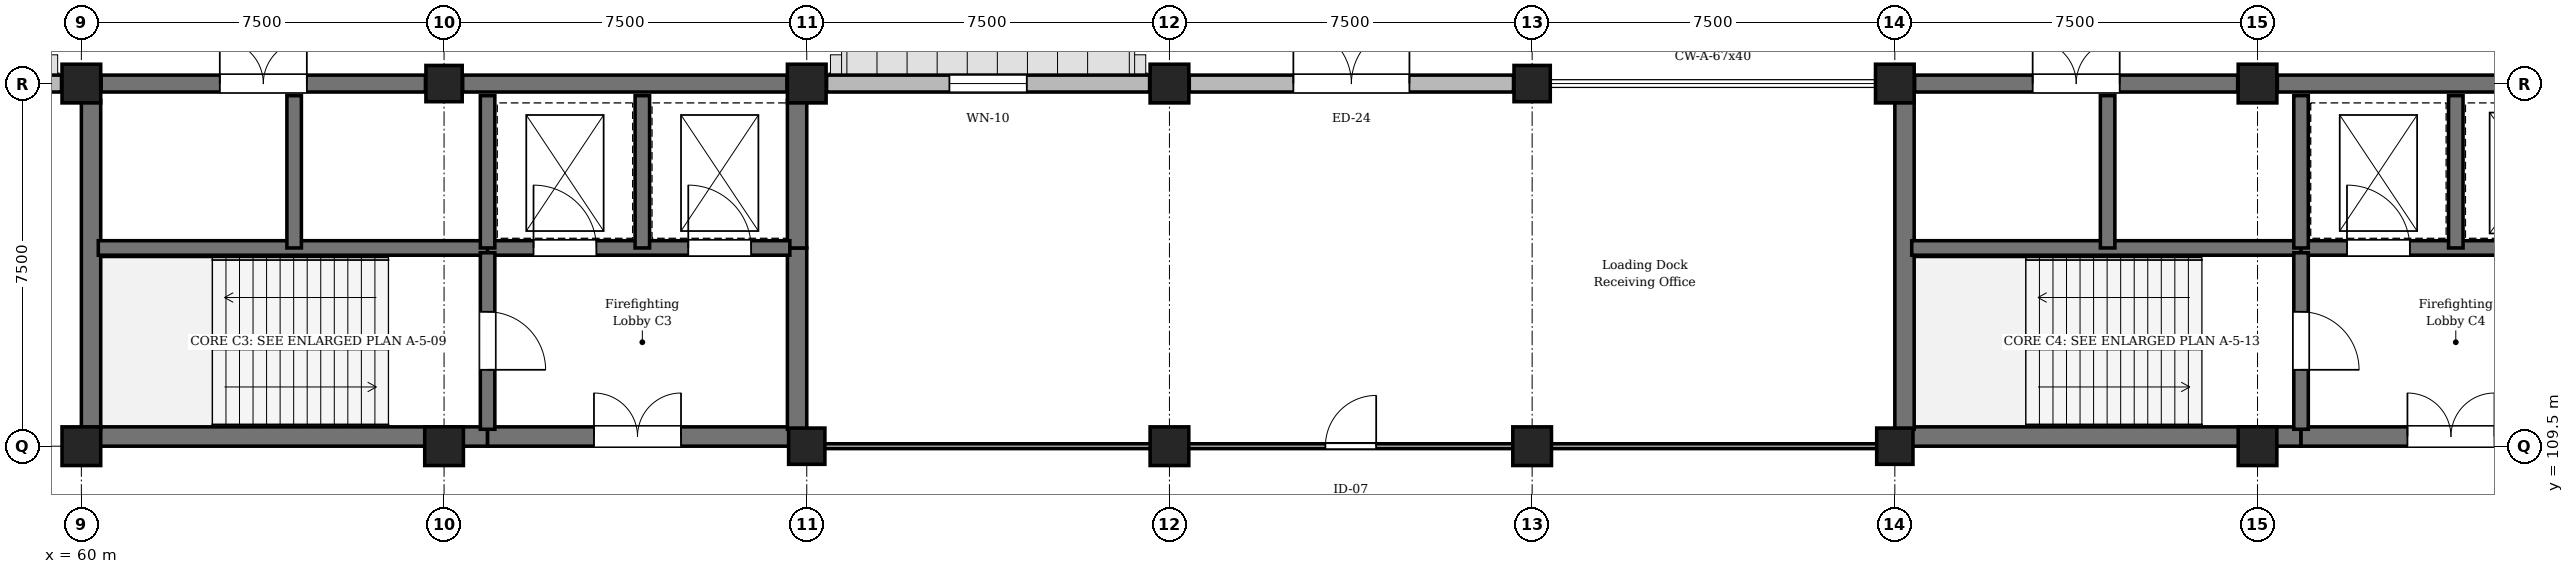
"""IFC4 building model, lengths in metres.
Left out: names, types, materials, properties, quantities, classifications, styles, units other than length and angle.
Written with IfcOpenShell. Run it as: python <this file> out.ifc"""

import sys

from ifc_helpers import new_model, si_unit, direction, frame, frame_2d, origin, origin_2d, place, context, subcontext, project, spatial, rectangle, circle, extrude, element, fill, save


model = new_model("IFC4")
c1 = context("Model", 3, precision=1e-05, world=origin(), true_north=direction((0.0, 1.0)))
c2 = subcontext(c1, "Body", "Model", "MODEL_VIEW")
j1 = project(units=[si_unit("LENGTHUNIT", "METRE"), si_unit("PLANEANGLEUNIT", "RADIAN")], contexts=[c1])
p1 = place(None, origin())
s1 = spatial("IfcSite", under=j1, at=p1, CompositionType="ELEMENT")
p2 = place(p1, origin())
s2 = spatial("IfcBuilding", under=s1, at=p2, CompositionType="ELEMENT")
p3 = place(p2, origin())
s3 = spatial("IfcBuildingStorey", under=s2, at=p3, CompositionType="ELEMENT", Elevation=0.0)
for number, where, z_axis, x_axis in (
    (1, (60.0, 109.5, 0.0), (0.0, 0.0, 1.0), (1.0, 0.0, 0.0)),
    (2, (60.0, 117.0, 0.0), (0.0, 0.0, 1.0), (1.0, 0.0, 0.0)),
    (3, (67.5, 109.5, 0.0), (0.0, 0.0, 1.0), (1.0, 0.0, 0.0)),
):
    element("IfcColumn", number, at=place(p3, frame(where, z_axis=z_axis, x_axis=x_axis)), inside=s3, PredefinedType="COLUMN", context=c2, shape_type="SweptSolid", body=[
        extrude(rectangle(XDim=0.8, YDim=0.8, at=origin_2d()), origin(), (0.0, 0.0, 1.0), 4.8),
    ])
for number, where, z_axis, x_axis in (
    (4, (67.5, 117.0, 0.0), (0.0, 0.0, 1.0), (1.0, 0.0, 0.0)),
    (5, (75.0, 109.5, 0.0), (0.0, 0.0, 1.0), (1.0, 0.0, 0.0)),
):
    element("IfcColumn", number, at=place(p3, frame(where, z_axis=z_axis, x_axis=x_axis)), inside=s3, PredefinedType="COLUMN", context=c2, shape_type="SweptSolid", body=[
        extrude(circle(Radius=0.375, at=origin_2d()), origin(), (0.0, 0.0, 1.0), 4.8),
    ])
for number, where, z_axis, x_axis in (
    (6, (75.0, 117.0, 0.0), (0.0, 0.0, 1.0), (1.0, 0.0, 0.0)),
    (7, (82.5, 109.5, 0.0), (0.0, 0.0, 1.0), (1.0, 0.0, 0.0)),
    (8, (82.5, 117.0, 0.0), (0.0, 0.0, 1.0), (1.0, 0.0, 0.0)),
    (9, (90.0, 109.5, 0.0), (0.0, 0.0, 1.0), (1.0, 0.0, 0.0)),
):
    element("IfcColumn", number, at=place(p3, frame(where, z_axis=z_axis, x_axis=x_axis)), inside=s3, PredefinedType="COLUMN", context=c2, shape_type="SweptSolid", body=[
        extrude(rectangle(XDim=0.8, YDim=0.8, at=origin_2d()), origin(), (0.0, 0.0, 1.0), 4.8),
    ])
for number, where, z_axis, x_axis in (
    (10, (90.0, 117.0, 0.0), (0.0, 0.0, 1.0), (1.0, 0.0, 0.0)),
    (11, (97.5, 109.5, 0.0), (0.0, 0.0, 1.0), (1.0, 0.0, 0.0)),
):
    element("IfcColumn", number, at=place(p3, frame(where, z_axis=z_axis, x_axis=x_axis)), inside=s3, PredefinedType="COLUMN", context=c2, shape_type="SweptSolid", body=[
        extrude(circle(Radius=0.375, at=origin_2d()), origin(), (0.0, 0.0, 1.0), 4.8),
    ])
for number, where, z_axis, x_axis in (
    (12, (97.5, 117.0, 0.0), (0.0, 0.0, 1.0), (1.0, 0.0, 0.0)),
    (13, (105.0, 109.5, 0.0), (0.0, 0.0, 1.0), (1.0, 0.0, 0.0)),
    (14, (105.0, 117.0, 0.0), (0.0, 0.0, 1.0), (1.0, 0.0, 0.0)),
):
    element("IfcColumn", number, at=place(p3, frame(where, z_axis=z_axis, x_axis=x_axis)), inside=s3, PredefinedType="COLUMN", context=c2, shape_type="SweptSolid", body=[
        extrude(rectangle(XDim=0.8, YDim=0.8, at=origin_2d()), origin(), (0.0, 0.0, 1.0), 4.8),
    ])
p4 = place(p3, frame((52.885, 117.0, 0.0), z_axis=(0.0, 0.0, 1.0), x_axis=(1.0, 0.0, 0.0)))
e15 = element("IfcWall", 15, at=p4, inside=s3, PredefinedType="STANDARD", context=c2, shape_type="SweptSolid", body=[
    extrude(rectangle(XDim=6.705, YDim=0.35, at=frame_2d((3.353, 0.0))), origin(), (0.0, 0.0, 1.0), 3.95),
])
p5 = place(p4, frame((2.752, 0.0, 0.9)))
e16 = element("IfcOpeningElement", 16, at=p5, cuts=e15, PredefinedType="OPENING", context=c2, shape_type="SweptSolid", body=[
    extrude(rectangle(XDim=1.2, YDim=2.1, at=frame_2d((0.6, 1.05))), frame((0.0, 0.185, 0.0), z_axis=(0.0, -1.0, 0.0), x_axis=(1.0, 0.0, 0.0)), (0.0, 0.0, 1.0), 0.37),
])
p6 = place(p3, frame((60.41, 117.0, 0.0), z_axis=(0.0, 0.0, 1.0), x_axis=(1.0, 0.0, 0.0)))
e17 = element("IfcWall", 17, at=p6, inside=s3, PredefinedType="SHEAR", context=c2, shape_type="SweptSolid", body=[
    extrude(rectangle(XDim=6.705, YDim=0.35, at=frame_2d((3.353, 0.0))), origin(), (0.0, 0.0, 1.0), 4.5),
])
p7 = place(p6, frame((2.452, 0.0, 0.0)))
e18 = element("IfcOpeningElement", 18, at=p7, cuts=e17, PredefinedType="OPENING", context=c2, shape_type="SweptSolid", body=[
    extrude(rectangle(XDim=1.8, YDim=2.5, at=frame_2d((0.9, 1.25))), frame((0.0, 0.185, 0.0), z_axis=(0.0, -1.0, 0.0), x_axis=(1.0, 0.0, 0.0)), (0.0, 0.0, 1.0), 0.37),
])
p8 = place(p3, frame((67.885, 117.0, 0.0), z_axis=(0.0, 0.0, 1.0), x_axis=(1.0, 0.0, 0.0)))
e19 = element("IfcWall", 19, at=p8, inside=s3, PredefinedType="SHEAR", context=c2, shape_type="SweptSolid", body=[
    extrude(rectangle(XDim=6.705, YDim=0.35, at=frame_2d((3.353, 0.0))), origin(), (0.0, 0.0, 1.0), 4.5),
])
p9 = place(p3, frame((75.41, 117.0, 0.0), z_axis=(0.0, 0.0, 1.0), x_axis=(1.0, 0.0, 0.0)))
e20 = element("IfcWall", 20, at=p9, inside=s3, PredefinedType="STANDARD", context=c2, shape_type="SweptSolid", body=[
    extrude(rectangle(XDim=6.68, YDim=0.35, at=frame_2d((3.34, 0.0))), origin(), (0.0, 0.0, 1.0), 3.95),
])
p10 = place(p9, frame((2.54, 0.0, 0.9)))
e21 = element("IfcOpeningElement", 21, at=p10, cuts=e20, PredefinedType="OPENING", context=c2, shape_type="SweptSolid", body=[
    extrude(rectangle(XDim=1.6, YDim=1.95, at=frame_2d((0.8, 0.975))), frame((0.0, 0.185, 0.0), z_axis=(0.0, -1.0, 0.0), x_axis=(1.0, 0.0, 0.0)), (0.0, 0.0, 1.0), 0.37),
])
p11 = place(p3, frame((82.91, 117.0, 0.0), z_axis=(0.0, 0.0, 1.0), x_axis=(1.0, 0.0, 0.0)))
e22 = element("IfcWall", 22, at=p11, inside=s3, PredefinedType="STANDARD", context=c2, shape_type="SweptSolid", body=[
    extrude(rectangle(XDim=6.705, YDim=0.35, at=frame_2d((3.353, 0.0))), origin(), (0.0, 0.0, 1.0), 3.95),
])
p12 = place(p11, frame((2.153, 0.0, 0.0)))
e23 = element("IfcOpeningElement", 23, at=p12, cuts=e22, PredefinedType="OPENING", context=c2, shape_type="SweptSolid", body=[
    extrude(rectangle(XDim=2.4, YDim=2.7, at=frame_2d((1.2, 1.35))), frame((0.0, 0.185, 0.0), z_axis=(0.0, -1.0, 0.0), x_axis=(1.0, 0.0, 0.0)), (0.0, 0.0, 1.0), 0.37),
])
p13 = place(p3, frame((97.91, 117.0, 0.0), z_axis=(0.0, 0.0, 1.0), x_axis=(1.0, 0.0, 0.0)))
e24 = element("IfcWall", 24, at=p13, inside=s3, PredefinedType="SHEAR", context=c2, shape_type="SweptSolid", body=[
    extrude(rectangle(XDim=6.68, YDim=0.35, at=frame_2d((3.34, 0.0))), origin(), (0.0, 0.0, 1.0), 4.5),
])
p14 = place(p13, frame((2.44, 0.0, 0.0)))
e25 = element("IfcOpeningElement", 25, at=p14, cuts=e24, PredefinedType="OPENING", context=c2, shape_type="SweptSolid", body=[
    extrude(rectangle(XDim=1.8, YDim=2.5, at=frame_2d((0.9, 1.25))), frame((0.0, 0.185, 0.0), z_axis=(0.0, -1.0, 0.0), x_axis=(1.0, 0.0, 0.0)), (0.0, 0.0, 1.0), 0.37),
])
p15 = place(p3, frame((105.41, 117.0, 0.0), z_axis=(0.0, 0.0, 1.0), x_axis=(1.0, 0.0, 0.0)))
e26 = element("IfcWall", 26, at=p15, inside=s3, PredefinedType="SHEAR", context=c2, shape_type="SweptSolid", body=[
    extrude(rectangle(XDim=6.705, YDim=0.35, at=frame_2d((3.353, 0.0))), origin(), (0.0, 0.0, 1.0), 4.5),
])
p16 = place(p3, frame((60.35, 109.7, 0.0), z_axis=(0.0, 0.0, 1.0), x_axis=(1.0, 0.0, 0.0)))
e27 = element("IfcWall", 27, at=p16, inside=s3, PredefinedType="SHEAR", context=c2, shape_type="SweptSolid", body=[
    extrude(rectangle(XDim=8.05, YDim=0.4, at=frame_2d((4.025, 0.0))), origin(), (0.0, 0.0, 1.0), 4.5),
])
p17 = place(p3, frame((68.4, 109.7, 0.0), z_axis=(0.0, 0.0, 1.0), x_axis=(1.0, 0.0, 0.0)))
e28 = element("IfcWall", 28, at=p17, inside=s3, PredefinedType="SHEAR", context=c2, shape_type="SweptSolid", body=[
    extrude(rectangle(XDim=6.25, YDim=0.4, at=frame_2d((3.125, 0.0))), origin(), (0.0, 0.0, 1.0), 4.5),
])
p18 = place(p17, frame((2.2, 0.0, 0.0)))
e29 = element("IfcOpeningElement", 29, at=p18, cuts=e28, PredefinedType="OPENING", context=c2, shape_type="SweptSolid", body=[
    extrude(rectangle(XDim=1.8, YDim=2.25, at=frame_2d((0.9, 1.125))), frame((0.0, 0.21, 0.0), z_axis=(0.0, -1.0, 0.0), x_axis=(1.0, 0.0, 0.0)), (0.0, 0.0, 1.0), 0.42),
])
p19 = place(p3, frame((60.2, 109.85, 0.0), z_axis=(0.0, 0.0, 1.0), x_axis=(0.0, 1.0, 0.0)))
e30 = element("IfcWall", 30, at=p19, inside=s3, PredefinedType="SHEAR", context=c2, shape_type="SweptSolid", body=[
    extrude(rectangle(XDim=6.8, YDim=0.4, at=frame_2d((3.4, 0.0))), origin(), (0.0, 0.0, 1.0), 4.5),
])
p20 = place(p3, frame((74.8, 109.85, 0.0), z_axis=(0.0, 0.0, 1.0), x_axis=(0.0, 1.0, 0.0)))
e31 = element("IfcWall", 31, at=p20, inside=s3, PredefinedType="SHEAR", context=c2, shape_type="SweptSolid", body=[
    extrude(rectangle(XDim=3.75, YDim=0.4, at=frame_2d((1.875, 0.0))), origin(), (0.0, 0.0, 1.0), 4.5),
])
p21 = place(p3, frame((74.8, 113.6, 0.0), z_axis=(0.0, 0.0, 1.0), x_axis=(0.0, 1.0, 0.0)))
e32 = element("IfcWall", 32, at=p21, inside=s3, PredefinedType="SHEAR", context=c2, shape_type="SweptSolid", body=[
    extrude(rectangle(XDim=3.05, YDim=0.4, at=frame_2d((1.525, 0.0))), origin(), (0.0, 0.0, 1.0), 4.5),
])
p22 = place(p3, frame((60.35, 113.6, 0.0), z_axis=(0.0, 0.0, 1.0), x_axis=(1.0, 0.0, 0.0)))
e33 = element("IfcWall", 33, at=p22, inside=s3, PredefinedType="SHEAR", context=c2, shape_type="SweptSolid", body=[
    extrude(rectangle(XDim=8.05, YDim=0.3, at=frame_2d((4.025, 0.0))), origin(), (0.0, 0.0, 1.0), 4.5),
])
p23 = place(p3, frame((68.4, 113.6, 0.0), z_axis=(0.0, 0.0, 1.0), x_axis=(1.0, 0.0, 0.0)))
e34 = element("IfcWall", 34, at=p23, inside=s3, PredefinedType="SHEAR", context=c2, shape_type="SweptSolid", body=[
    extrude(rectangle(XDim=6.25, YDim=0.3, at=frame_2d((3.125, 0.0))), origin(), (0.0, 0.0, 1.0), 4.5),
])
p24 = place(p23, frame((0.95, 0.0, 0.0)))
e35 = element("IfcOpeningElement", 35, at=p24, cuts=e34, PredefinedType="OPENING", context=c2, shape_type="SweptSolid", body=[
    extrude(rectangle(XDim=1.3, YDim=2.2, at=frame_2d((0.65, 1.1))), frame((0.0, 0.16, 0.0), z_axis=(0.0, -1.0, 0.0), x_axis=(1.0, 0.0, 0.0)), (0.0, 0.0, 1.0), 0.32),
])
p25 = place(p23, frame((4.15, 0.0, 0.0)))
e36 = element("IfcOpeningElement", 36, at=p25, cuts=e34, PredefinedType="OPENING", context=c2, shape_type="SweptSolid", body=[
    extrude(rectangle(XDim=1.3, YDim=2.2, at=frame_2d((0.65, 1.1))), frame((0.0, 0.16, 0.0), z_axis=(0.0, -1.0, 0.0), x_axis=(1.0, 0.0, 0.0)), (0.0, 0.0, 1.0), 0.32),
])
p26 = place(p3, frame((68.4, 113.5, 0.0), z_axis=(0.0, 0.0, 1.0), x_axis=(0.0, -1.0, 0.0)))
e37 = element("IfcWall", 37, at=p26, inside=s3, PredefinedType="SHEAR", context=c2, shape_type="SweptSolid", body=[
    extrude(rectangle(XDim=3.65, YDim=0.3, at=frame_2d((1.825, 0.0))), origin(), (0.0, 0.0, 1.0), 4.5),
])
p27 = place(p26, frame((1.22, 0.0, 0.0)))
e38 = element("IfcOpeningElement", 38, at=p27, cuts=e37, PredefinedType="OPENING", context=c2, shape_type="SweptSolid", body=[
    extrude(rectangle(XDim=1.2, YDim=2.25, at=frame_2d((0.6, 1.125))), frame((0.0, 0.16, 0.0), z_axis=(0.0, -1.0, 0.0), x_axis=(1.0, 0.0, 0.0)), (0.0, 0.0, 1.0), 0.32),
])
for number, where, z_axis, x_axis in (
    (39, (64.4, 113.6, 0.0), (0.0, 0.0, 1.0), (0.0, 1.0, 0.0)),
    (40, (68.4, 113.6, 0.0), (0.0, 0.0, 1.0), (0.0, 1.0, 0.0)),
    (41, (71.6, 113.6, 0.0), (0.0, 0.0, 1.0), (0.0, 1.0, 0.0)),
):
    element("IfcWall", number, at=place(p3, frame(where, z_axis=z_axis, x_axis=x_axis)), inside=s3, PredefinedType="SHEAR", context=c2, shape_type="SweptSolid", body=[
        extrude(rectangle(XDim=3.15, YDim=0.3, at=frame_2d((1.575, 0.0))), origin(), (0.0, 0.0, 1.0), 4.5),
    ])
p28 = place(p3, frame((97.85, 109.7, 0.0), z_axis=(0.0, 0.0, 1.0), x_axis=(1.0, 0.0, 0.0)))
e42 = element("IfcWall", 42, at=p28, inside=s3, PredefinedType="SHEAR", context=c2, shape_type="SweptSolid", body=[
    extrude(rectangle(XDim=8.05, YDim=0.4, at=frame_2d((4.025, 0.0))), origin(), (0.0, 0.0, 1.0), 4.5),
])
p29 = place(p3, frame((105.9, 109.7, 0.0), z_axis=(0.0, 0.0, 1.0), x_axis=(1.0, 0.0, 0.0)))
e43 = element("IfcWall", 43, at=p29, inside=s3, PredefinedType="SHEAR", context=c2, shape_type="SweptSolid", body=[
    extrude(rectangle(XDim=6.25, YDim=0.4, at=frame_2d((3.125, 0.0))), origin(), (0.0, 0.0, 1.0), 4.5),
])
p30 = place(p29, frame((2.2, 0.0, 0.0)))
e44 = element("IfcOpeningElement", 44, at=p30, cuts=e43, PredefinedType="OPENING", context=c2, shape_type="SweptSolid", body=[
    extrude(rectangle(XDim=1.8, YDim=2.25, at=frame_2d((0.9, 1.125))), frame((0.0, 0.21, 0.0), z_axis=(0.0, -1.0, 0.0), x_axis=(1.0, 0.0, 0.0)), (0.0, 0.0, 1.0), 0.42),
])
p31 = place(p3, frame((97.7, 109.85, 0.0), z_axis=(0.0, 0.0, 1.0), x_axis=(0.0, 1.0, 0.0)))
e45 = element("IfcWall", 45, at=p31, inside=s3, PredefinedType="SHEAR", context=c2, shape_type="SweptSolid", body=[
    extrude(rectangle(XDim=6.8, YDim=0.4, at=frame_2d((3.4, 0.0))), origin(), (0.0, 0.0, 1.0), 4.5),
])
p32 = place(p3, frame((97.85, 113.6, 0.0), z_axis=(0.0, 0.0, 1.0), x_axis=(1.0, 0.0, 0.0)))
e46 = element("IfcWall", 46, at=p32, inside=s3, PredefinedType="SHEAR", context=c2, shape_type="SweptSolid", body=[
    extrude(rectangle(XDim=8.05, YDim=0.3, at=frame_2d((4.025, 0.0))), origin(), (0.0, 0.0, 1.0), 4.5),
])
p33 = place(p3, frame((105.9, 113.6, 0.0), z_axis=(0.0, 0.0, 1.0), x_axis=(1.0, 0.0, 0.0)))
e47 = element("IfcWall", 47, at=p33, inside=s3, PredefinedType="SHEAR", context=c2, shape_type="SweptSolid", body=[
    extrude(rectangle(XDim=6.25, YDim=0.3, at=frame_2d((3.125, 0.0))), origin(), (0.0, 0.0, 1.0), 4.5),
])
p34 = place(p33, frame((0.95, 0.0, 0.0)))
e48 = element("IfcOpeningElement", 48, at=p34, cuts=e47, PredefinedType="OPENING", context=c2, shape_type="SweptSolid", body=[
    extrude(rectangle(XDim=1.3, YDim=2.2, at=frame_2d((0.65, 1.1))), frame((0.0, 0.16, 0.0), z_axis=(0.0, -1.0, 0.0), x_axis=(1.0, 0.0, 0.0)), (0.0, 0.0, 1.0), 0.32),
])
p35 = place(p33, frame((4.1, 0.0, 0.0)))
e49 = element("IfcOpeningElement", 49, at=p35, cuts=e47, PredefinedType="OPENING", context=c2, shape_type="SweptSolid", body=[
    extrude(rectangle(XDim=1.4, YDim=2.25, at=frame_2d((0.7, 1.125))), frame((0.0, 0.16, 0.0), z_axis=(0.0, -1.0, 0.0), x_axis=(1.0, 0.0, 0.0)), (0.0, 0.0, 1.0), 0.32),
])
p36 = place(p3, frame((105.9, 113.5, 0.0), z_axis=(0.0, 0.0, 1.0), x_axis=(0.0, -1.0, 0.0)))
e50 = element("IfcWall", 50, at=p36, inside=s3, PredefinedType="SHEAR", context=c2, shape_type="SweptSolid", body=[
    extrude(rectangle(XDim=3.65, YDim=0.3, at=frame_2d((1.825, 0.0))), origin(), (0.0, 0.0, 1.0), 4.5),
])
p37 = place(p36, frame((1.22, 0.0, 0.0)))
e51 = element("IfcOpeningElement", 51, at=p37, cuts=e50, PredefinedType="OPENING", context=c2, shape_type="SweptSolid", body=[
    extrude(rectangle(XDim=1.2, YDim=2.25, at=frame_2d((0.6, 1.125))), frame((0.0, 0.16, 0.0), z_axis=(0.0, -1.0, 0.0), x_axis=(1.0, 0.0, 0.0)), (0.0, 0.0, 1.0), 0.32),
])
for number, where, z_axis, x_axis in (
    (52, (101.9, 113.6, 0.0), (0.0, 0.0, 1.0), (0.0, 1.0, 0.0)),
    (53, (105.9, 113.6, 0.0), (0.0, 0.0, 1.0), (0.0, 1.0, 0.0)),
    (54, (109.1, 113.6, 0.0), (0.0, 0.0, 1.0), (0.0, 1.0, 0.0)),
):
    element("IfcWall", number, at=place(p3, frame(where, z_axis=z_axis, x_axis=x_axis)), inside=s3, PredefinedType="SHEAR", context=c2, shape_type="SweptSolid", body=[
        extrude(rectangle(XDim=3.15, YDim=0.3, at=frame_2d((1.575, 0.0))), origin(), (0.0, 0.0, 1.0), 4.5),
    ])
p38 = place(p3, frame((75.3, 109.5, 0.0), z_axis=(0.0, 0.0, 1.0), x_axis=(1.0, 0.0, 0.0)))
e55 = element("IfcWall", 55, at=p38, inside=s3, PredefinedType="PARTITIONING", context=c2, shape_type="SweptSolid", body=[
    extrude(rectangle(XDim=21.9, YDim=0.1, at=frame_2d((10.95, 0.0))), origin(), (0.0, 0.0, 1.0), 3.835),
])
p39 = place(p38, frame((10.425, 0.0, 0.0)))
e56 = element("IfcOpeningElement", 56, at=p39, cuts=e55, PredefinedType="OPENING", context=c2, shape_type="SweptSolid", body=[
    extrude(rectangle(XDim=1.05, YDim=2.2, at=frame_2d((0.525, 1.1))), frame((0.0, 0.06, 0.0), z_axis=(0.0, -1.0, 0.0), x_axis=(1.0, 0.0, 0.0)), (0.0, 0.0, 1.0), 0.12),
])
p40 = place(p7, origin())
e57 = element("IfcDoor", 57, at=p40, inside=s3, OperationType="DOUBLE_DOOR_SINGLE_SWING", PredefinedType="DOOR", context=c2, shape_type="SweptSolid", body=[
    extrude(rectangle(XDim=1.8, YDim=2.5, at=frame_2d((0.9, 1.25))), frame((0.0, 0.025, 0.0), z_axis=(0.0, -1.0, 0.0), x_axis=(1.0, 0.0, 0.0)), (0.0, 0.0, 1.0), 0.05),
])
fill(e18, e57)
p41 = place(p10, origin())
e58 = element("IfcWindow", 58, at=p41, inside=s3, PartitioningType="SINGLE_PANEL", PredefinedType="WINDOW", context=c2, shape_type="SweptSolid", body=[
    extrude(rectangle(XDim=1.6, YDim=1.95, at=frame_2d((0.8, 0.975))), frame((0.0, 0.03, 0.0), z_axis=(0.0, -1.0, 0.0), x_axis=(1.0, 0.0, 0.0)), (0.0, 0.0, 1.0), 0.06),
])
fill(e21, e58)
p42 = place(p12, origin())
e59 = element("IfcDoor", 59, at=p42, inside=s3, OperationType="DOUBLE_DOOR_SINGLE_SWING", PredefinedType="DOOR", context=c2, shape_type="SweptSolid", body=[
    extrude(rectangle(XDim=2.4, YDim=2.7, at=frame_2d((1.2, 1.35))), frame((0.0, 0.025, 0.0), z_axis=(0.0, -1.0, 0.0), x_axis=(1.0, 0.0, 0.0)), (0.0, 0.0, 1.0), 0.05),
])
fill(e23, e59)
p43 = place(p14, origin())
e60 = element("IfcDoor", 60, at=p43, inside=s3, OperationType="DOUBLE_DOOR_SINGLE_SWING", PredefinedType="DOOR", context=c2, shape_type="SweptSolid", body=[
    extrude(rectangle(XDim=1.8, YDim=2.5, at=frame_2d((0.9, 1.25))), frame((0.0, 0.025, 0.0), z_axis=(0.0, -1.0, 0.0), x_axis=(1.0, 0.0, 0.0)), (0.0, 0.0, 1.0), 0.05),
])
fill(e25, e60)
p44 = place(p18, origin())
e61 = element("IfcDoor", 61, at=p44, inside=s3, OperationType="DOUBLE_DOOR_SINGLE_SWING", PredefinedType="DOOR", context=c2, shape_type="SweptSolid", body=[
    extrude(rectangle(XDim=1.8, YDim=2.25, at=frame_2d((0.9, 1.125))), frame((0.0, 0.025, 0.0), z_axis=(0.0, -1.0, 0.0), x_axis=(1.0, 0.0, 0.0)), (0.0, 0.0, 1.0), 0.05),
])
fill(e29, e61)
p45 = place(p24, origin())
e62 = element("IfcDoor", 62, at=p45, inside=s3, OperationType="DOUBLE_DOOR_SLIDING", PredefinedType="DOOR", context=c2, shape_type="SweptSolid", body=[
    extrude(rectangle(XDim=1.3, YDim=2.2, at=frame_2d((0.65, 1.1))), frame((0.0, 0.025, 0.0), z_axis=(0.0, -1.0, 0.0), x_axis=(1.0, 0.0, 0.0)), (0.0, 0.0, 1.0), 0.05),
])
fill(e35, e62)
p46 = place(p25, origin())
e63 = element("IfcDoor", 63, at=p46, inside=s3, OperationType="DOUBLE_DOOR_SLIDING", PredefinedType="DOOR", context=c2, shape_type="SweptSolid", body=[
    extrude(rectangle(XDim=1.3, YDim=2.2, at=frame_2d((0.65, 1.1))), frame((0.0, 0.025, 0.0), z_axis=(0.0, -1.0, 0.0), x_axis=(1.0, 0.0, 0.0)), (0.0, 0.0, 1.0), 0.05),
])
fill(e36, e63)
p47 = place(p27, origin())
e64 = element("IfcDoor", 64, at=p47, inside=s3, OperationType="SINGLE_SWING_RIGHT", PredefinedType="DOOR", context=c2, shape_type="SweptSolid", body=[
    extrude(rectangle(XDim=1.2, YDim=2.25, at=frame_2d((0.6, 1.125))), frame((0.0, 0.025, 0.0), z_axis=(0.0, -1.0, 0.0), x_axis=(1.0, 0.0, 0.0)), (0.0, 0.0, 1.0), 0.05),
])
fill(e38, e64)
p48 = place(p30, origin())
e65 = element("IfcDoor", 65, at=p48, inside=s3, OperationType="DOUBLE_DOOR_SINGLE_SWING", PredefinedType="DOOR", context=c2, shape_type="SweptSolid", body=[
    extrude(rectangle(XDim=1.8, YDim=2.25, at=frame_2d((0.9, 1.125))), frame((0.0, 0.025, 0.0), z_axis=(0.0, -1.0, 0.0), x_axis=(1.0, 0.0, 0.0)), (0.0, 0.0, 1.0), 0.05),
])
fill(e44, e65)
p49 = place(p34, origin())
e66 = element("IfcDoor", 66, at=p49, inside=s3, OperationType="DOUBLE_DOOR_SLIDING", PredefinedType="DOOR", context=c2, shape_type="SweptSolid", body=[
    extrude(rectangle(XDim=1.3, YDim=2.2, at=frame_2d((0.65, 1.1))), frame((0.0, 0.025, 0.0), z_axis=(0.0, -1.0, 0.0), x_axis=(1.0, 0.0, 0.0)), (0.0, 0.0, 1.0), 0.05),
])
fill(e48, e66)
p50 = place(p37, origin())
e67 = element("IfcDoor", 67, at=p50, inside=s3, OperationType="SINGLE_SWING_RIGHT", PredefinedType="DOOR", context=c2, shape_type="SweptSolid", body=[
    extrude(rectangle(XDim=1.2, YDim=2.25, at=frame_2d((0.6, 1.125))), frame((0.0, 0.025, 0.0), z_axis=(0.0, -1.0, 0.0), x_axis=(1.0, 0.0, 0.0)), (0.0, 0.0, 1.0), 0.05),
])
fill(e51, e67)
p51 = place(p39, origin())
e68 = element("IfcDoor", 68, at=p51, inside=s3, OperationType="SINGLE_SWING_RIGHT", PredefinedType="DOOR", context=c2, shape_type="SweptSolid", body=[
    extrude(rectangle(XDim=1.05, YDim=2.2, at=frame_2d((0.525, 1.1))), frame((0.0, 0.025, 0.0), z_axis=(0.0, -1.0, 0.0), x_axis=(1.0, 0.0, 0.0)), (0.0, 0.0, 1.0), 0.05),
])
fill(e56, e68)
save(model, sys.argv[1])
